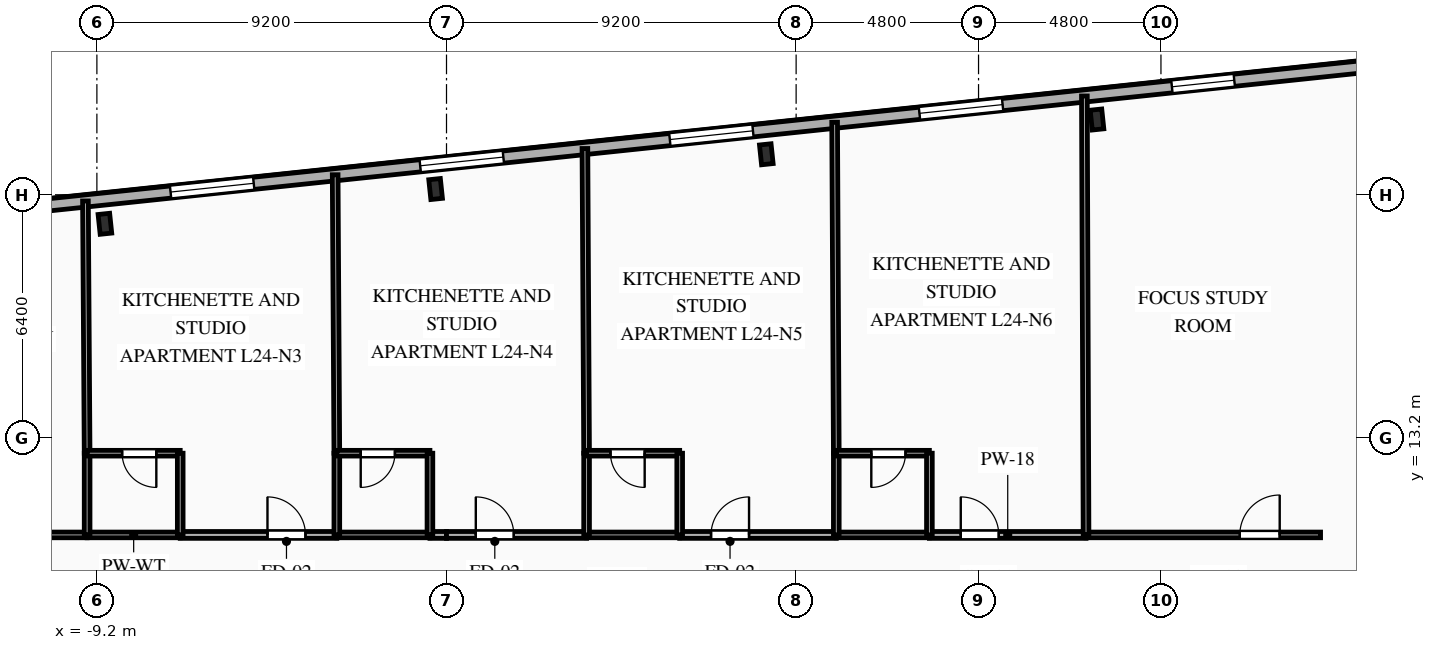
"""IFC4 building model, lengths in metres.
Left out: names, types, materials, properties, quantities, classifications, styles, units other than length and angle.
Written with IfcOpenShell. Run it as: python <this file> out.ifc"""

import sys

from ifc_helpers import new_model, si_unit, direction, frame, frame_2d, origin, origin_2d, place, context, subcontext, project, spatial, rectangle, i_section, extrude, element, fill, save


model = new_model("IFC4")
c1 = context("Model", 3, precision=1e-05, world=origin(), true_north=direction((0.0, 1.0)))
c2 = subcontext(c1, "Body", "Model", "MODEL_VIEW")
j1 = project(units=[si_unit("LENGTHUNIT", "METRE"), si_unit("PLANEANGLEUNIT", "RADIAN")], contexts=[c1])
p1 = place(None, origin())
s1 = spatial("IfcSite", under=j1, at=p1, CompositionType="ELEMENT")
p2 = place(p1, origin())
s2 = spatial("IfcBuilding", under=s1, at=p2, CompositionType="ELEMENT")
p3 = place(p2, frame((0.0, 0.0, 89.05)))
s3 = spatial("IfcBuildingStorey", under=s2, at=p3, CompositionType="ELEMENT", Elevation=89.05)
for number, where, z_axis, x_axis in (
    (1, (17.117, 21.58, 0.0), (0.0, 0.0, 1.0), (0.995, 0.105, 0.0)),
    (2, (8.415, 20.666, 0.0), (0.0, 0.0, 1.0), (0.995, 0.105, 0.0)),
    (3, (-0.287, 19.751, 0.0), (0.0, 0.0, 1.0), (0.995, 0.105, 0.0)),
    (4, (-8.989, 18.836, 0.0), (0.0, 0.0, 1.0), (0.995, 0.105, 0.0)),
):
    element("IfcColumn", number, at=place(p3, frame(where, z_axis=z_axis, x_axis=x_axis)), inside=s3, PredefinedType="COLUMN", context=c2, shape_type="SweptSolid", body=[
        extrude(i_section(OverallWidth=0.306, OverallDepth=0.524, WebThickness=0.021, FlangeThickness=0.04, FilletRadius=0.027, at=origin_2d()), origin(), (0.0, 0.0, 1.0), 3.35),
    ])
p4 = place(p3, frame((-27.107, 17.586, 0.0), z_axis=(0.0, 0.0, 1.0), x_axis=(0.994521628355, 0.104531003701, 0.0)))
e5 = element("IfcWall", 5, at=p4, inside=s3, PredefinedType="SOLIDWALL", context=c2, shape_type="SweptSolid", body=[
    extrude(rectangle(XDim=53.8, YDim=0.32, at=frame_2d((26.9, 0.0))), origin(), (0.0, 0.0, 1.0), 3.045),
])
p5 = place(p4, frame((6.781, 0.0, 0.85)))
e6 = element("IfcOpeningElement", 6, at=p5, cuts=e5, PredefinedType="OPENING", context=c2, shape_type="SweptSolid", body=[
    extrude(rectangle(XDim=1.65, YDim=1.85, at=frame_2d((0.825, 0.925))), frame((0.0, 0.17, 0.0), z_axis=(0.0, -1.0, 0.0), x_axis=(1.0, 0.0, 0.0)), (0.0, 0.0, 1.0), 0.34),
])
p6 = place(p4, frame((14.862, 0.0, 0.85)))
e7 = element("IfcOpeningElement", 7, at=p6, cuts=e5, PredefinedType="OPENING", context=c2, shape_type="SweptSolid", body=[
    extrude(rectangle(XDim=1.5, YDim=1.85, at=frame_2d((0.75, 0.925))), frame((0.0, 0.17, 0.0), z_axis=(0.0, -1.0, 0.0), x_axis=(1.0, 0.0, 0.0)), (0.0, 0.0, 1.0), 0.34),
])
p7 = place(p4, frame((19.956, 0.0, 0.85)))
e8 = element("IfcOpeningElement", 8, at=p7, cuts=e5, PredefinedType="OPENING", context=c2, shape_type="SweptSolid", body=[
    extrude(rectangle(XDim=2.2, YDim=1.85, at=frame_2d((1.1, 0.925))), frame((0.0, 0.17, 0.0), z_axis=(0.0, -1.0, 0.0), x_axis=(1.0, 0.0, 0.0)), (0.0, 0.0, 1.0), 0.34),
])
p8 = place(p4, frame((26.561, 0.0, 0.85)))
e9 = element("IfcOpeningElement", 9, at=p8, cuts=e5, PredefinedType="OPENING", context=c2, shape_type="SweptSolid", body=[
    extrude(rectangle(XDim=2.2, YDim=1.85, at=frame_2d((1.1, 0.925))), frame((0.0, 0.17, 0.0), z_axis=(0.0, -1.0, 0.0), x_axis=(1.0, 0.0, 0.0)), (0.0, 0.0, 1.0), 0.34),
])
p9 = place(p4, frame((33.166, 0.0, 0.85)))
e10 = element("IfcOpeningElement", 10, at=p9, cuts=e5, PredefinedType="OPENING", context=c2, shape_type="SweptSolid", body=[
    extrude(rectangle(XDim=2.2, YDim=1.85, at=frame_2d((1.1, 0.925))), frame((0.0, 0.17, 0.0), z_axis=(0.0, -1.0, 0.0), x_axis=(1.0, 0.0, 0.0)), (0.0, 0.0, 1.0), 0.34),
])
p10 = place(p4, frame((39.771, 0.0, 0.85)))
e11 = element("IfcOpeningElement", 11, at=p10, cuts=e5, PredefinedType="OPENING", context=c2, shape_type="SweptSolid", body=[
    extrude(rectangle(XDim=2.2, YDim=1.85, at=frame_2d((1.1, 0.925))), frame((0.0, 0.17, 0.0), z_axis=(0.0, -1.0, 0.0), x_axis=(1.0, 0.0, 0.0)), (0.0, 0.0, 1.0), 0.34),
])
p11 = place(p4, frame((46.45, 0.0, 0.85)))
e12 = element("IfcOpeningElement", 12, at=p11, cuts=e5, PredefinedType="OPENING", context=c2, shape_type="SweptSolid", body=[
    extrude(rectangle(XDim=1.65, YDim=1.85, at=frame_2d((0.825, 0.925))), frame((0.0, 0.17, 0.0), z_axis=(0.0, -1.0, 0.0), x_axis=(1.0, 0.0, 0.0)), (0.0, 0.0, 1.0), 0.34),
])
p12 = place(p3, frame((-13.679, 10.65, 0.0), z_axis=(0.0, 0.0, 1.0), x_axis=(1.0, 0.0, 0.0)))
e13 = element("IfcWall", 13, at=p12, inside=s3, PredefinedType="PARTITIONING", context=c2, shape_type="SweptSolid", body=[
    extrude(rectangle(XDim=4.222, YDim=0.15, at=frame_2d((2.111, 0.0))), origin(), (0.0, 0.0, 1.0), 3.045),
])
p13 = place(p12, frame((0.844, 0.0, 0.0)))
e14 = element("IfcOpeningElement", 14, at=p13, cuts=e13, PredefinedType="OPENING", context=c2, shape_type="SweptSolid", body=[
    extrude(rectangle(XDim=0.95, YDim=2.1, at=frame_2d((0.475, 1.05))), frame((0.0, 0.085, 0.0), z_axis=(0.0, -1.0, 0.0), x_axis=(1.0, 0.0, 0.0)), (0.0, 0.0, 1.0), 0.17),
])
p14 = place(p3, frame((-7.007, 10.65, 0.0), z_axis=(0.0, 0.0, 1.0), x_axis=(1.0, 0.0, 0.0)))
e15 = element("IfcWall", 15, at=p14, inside=s3, PredefinedType="PARTITIONING", context=c2, shape_type="SweptSolid", body=[
    extrude(rectangle(XDim=4.121, YDim=0.18, at=frame_2d((2.061, 0.0))), origin(), (0.0, 0.0, 1.0), 3.045),
])
p15 = place(p14, frame((2.296, 0.0, 0.0)))
e16 = element("IfcOpeningElement", 16, at=p15, cuts=e15, PredefinedType="OPENING", context=c2, shape_type="SweptSolid", body=[
    extrude(rectangle(XDim=1.0, YDim=2.15, at=frame_2d((0.5, 1.075))), frame((0.0, 0.1, 0.0), z_axis=(0.0, -1.0, 0.0), x_axis=(1.0, 0.0, 0.0)), (0.0, 0.0, 1.0), 0.2),
])
p16 = place(p3, frame((-9.457, 10.65, 0.0), z_axis=(0.0, 0.0, 1.0), x_axis=(1.0, 0.0, 0.0)))
e17 = element("IfcWall", 17, at=p16, inside=s3, PredefinedType="PLUMBINGWALL", context=c2, shape_type="SweptSolid", body=[
    extrude(rectangle(XDim=2.45, YDim=0.15, at=frame_2d((1.225, 0.0))), origin(), (0.0, 0.0, 1.0), 3.045),
])
p17 = place(p3, frame((-0.436, 10.65, 0.0), z_axis=(0.0, 0.0, 1.0), x_axis=(1.0, 0.0, 0.0)))
e18 = element("IfcWall", 18, at=p17, inside=s3, PredefinedType="PARTITIONING", context=c2, shape_type="SweptSolid", body=[
    extrude(rectangle(XDim=0.436, YDim=0.18, at=frame_2d((0.218, 0.0))), origin(), (0.0, 0.0, 1.0), 3.045),
])
p18 = place(p3, frame((-2.886, 10.65, 0.0), z_axis=(0.0, 0.0, 1.0), x_axis=(1.0, 0.0, 0.0)))
e19 = element("IfcWall", 19, at=p18, inside=s3, PredefinedType="PLUMBINGWALL", context=c2, shape_type="SweptSolid", body=[
    extrude(rectangle(XDim=2.45, YDim=0.15, at=frame_2d((1.225, 0.0))), origin(), (0.0, 0.0, 1.0), 3.045),
])
p19 = place(p3, frame((0.0, 10.65, 0.0), z_axis=(0.0, 0.0, 1.0), x_axis=(1.0, 0.0, 0.0)))
e20 = element("IfcWall", 20, at=p19, inside=s3, PredefinedType="PARTITIONING", context=c2, shape_type="SweptSolid", body=[
    extrude(rectangle(XDim=3.686, YDim=0.18, at=frame_2d((1.843, 0.0))), origin(), (0.0, 0.0, 1.0), 3.045),
])
p20 = place(p19, frame((0.771, 0.0, 0.0)))
e21 = element("IfcOpeningElement", 21, at=p20, cuts=e20, PredefinedType="OPENING", context=c2, shape_type="SweptSolid", body=[
    extrude(rectangle(XDim=1.0, YDim=2.15, at=frame_2d((0.5, 1.075))), frame((0.0, 0.1, 0.0), z_axis=(0.0, -1.0, 0.0), x_axis=(1.0, 0.0, 0.0)), (0.0, 0.0, 1.0), 0.2),
])
p21 = place(p3, frame((6.136, 10.65, 0.0), z_axis=(0.0, 0.0, 1.0), x_axis=(1.0, 0.0, 0.0)))
e22 = element("IfcWall", 22, at=p21, inside=s3, PredefinedType="PARTITIONING", context=c2, shape_type="SweptSolid", body=[
    extrude(rectangle(XDim=4.121, YDim=0.18, at=frame_2d((2.061, 0.0))), origin(), (0.0, 0.0, 1.0), 3.045),
])
p22 = place(p21, frame((0.825, 0.0, 0.0)))
e23 = element("IfcOpeningElement", 23, at=p22, cuts=e22, PredefinedType="OPENING", context=c2, shape_type="SweptSolid", body=[
    extrude(rectangle(XDim=1.0, YDim=2.15, at=frame_2d((0.5, 1.075))), frame((0.0, 0.1, 0.0), z_axis=(0.0, -1.0, 0.0), x_axis=(1.0, 0.0, 0.0)), (0.0, 0.0, 1.0), 0.2),
])
p23 = place(p3, frame((3.686, 10.65, 0.0), z_axis=(0.0, 0.0, 1.0), x_axis=(1.0, 0.0, 0.0)))
e24 = element("IfcWall", 24, at=p23, inside=s3, PredefinedType="PLUMBINGWALL", context=c2, shape_type="SweptSolid", body=[
    extrude(rectangle(XDim=2.45, YDim=0.15, at=frame_2d((1.225, 0.0))), origin(), (0.0, 0.0, 1.0), 3.045),
])
p24 = place(p3, frame((12.707, 10.65, 0.0), z_axis=(0.0, 0.0, 1.0), x_axis=(1.0, 0.0, 0.0)))
e25 = element("IfcWall", 25, at=p24, inside=s3, PredefinedType="PARTITIONING", context=c2, shape_type="SweptSolid", body=[
    extrude(rectangle(XDim=4.122, YDim=0.18, at=frame_2d((2.061, 0.0))), origin(), (0.0, 0.0, 1.0), 3.045),
])
p25 = place(p24, frame((0.825, 0.0, 0.0)))
e26 = element("IfcOpeningElement", 26, at=p25, cuts=e25, PredefinedType="OPENING", context=c2, shape_type="SweptSolid", body=[
    extrude(rectangle(XDim=1.0, YDim=2.15, at=frame_2d((0.5, 1.075))), frame((0.0, 0.1, 0.0), z_axis=(0.0, -1.0, 0.0), x_axis=(1.0, 0.0, 0.0)), (0.0, 0.0, 1.0), 0.2),
])
p26 = place(p3, frame((10.257, 10.65, 0.0), z_axis=(0.0, 0.0, 1.0), x_axis=(1.0, 0.0, 0.0)))
e27 = element("IfcWall", 27, at=p26, inside=s3, PredefinedType="PLUMBINGWALL", context=c2, shape_type="SweptSolid", body=[
    extrude(rectangle(XDim=2.45, YDim=0.15, at=frame_2d((1.225, 0.0))), origin(), (0.0, 0.0, 1.0), 3.045),
])
p27 = place(p3, frame((16.829, 10.65, 0.0), z_axis=(0.0, 0.0, 1.0), x_axis=(1.0, 0.0, 0.0)))
e28 = element("IfcWall", 28, at=p27, inside=s3, PredefinedType="PARTITIONING", context=c2, shape_type="SweptSolid", body=[
    extrude(rectangle(XDim=6.171, YDim=0.15, at=frame_2d((3.085, 0.0))), origin(), (0.0, 0.0, 1.0), 3.045),
])
p28 = place(p27, frame((4.046, 0.0, 0.0)))
e29 = element("IfcOpeningElement", 29, at=p28, cuts=e28, PredefinedType="OPENING", context=c2, shape_type="SweptSolid", body=[
    extrude(rectangle(XDim=1.05, YDim=2.15, at=frame_2d((0.525, 1.075))), frame((0.0, 0.085, 0.0), z_axis=(0.0, -1.0, 0.0), x_axis=(1.0, 0.0, 0.0)), (0.0, 0.0, 1.0), 0.17),
])
p29 = place(p3, frame((-9.501, 19.436, 0.0), z_axis=(0.0, 0.0, 1.0), x_axis=(0.006621884097, -0.999978075085, 0.0)))
e30 = element("IfcWall", 30, at=p29, inside=s3, PredefinedType="PARTITIONING", context=c2, shape_type="SweptSolid", body=[
    extrude(rectangle(XDim=6.636, YDim=0.15, at=frame_2d((3.318, 0.0))), origin(), (0.0, 0.0, 1.0), 3.045),
])
p30 = place(p3, frame((-9.457, 12.8, 0.0), z_axis=(0.0, 0.0, 1.0), x_axis=(0.0, -1.0, 0.0)))
e31 = element("IfcWall", 31, at=p30, inside=s3, PredefinedType="PLUMBINGWALL", context=c2, shape_type="SweptSolid", body=[
    extrude(rectangle(XDim=2.15, YDim=0.15, at=frame_2d((1.075, 0.0))), origin(), (0.0, 0.0, 1.0), 3.045),
])
p31 = place(p3, frame((-7.007, 12.8, 0.0), z_axis=(0.0, 0.0, 1.0), x_axis=(-1.0, 0.0, 0.0)))
e32 = element("IfcWall", 32, at=p31, inside=s3, PredefinedType="PLUMBINGWALL", context=c2, shape_type="SweptSolid", body=[
    extrude(rectangle(XDim=2.45, YDim=0.15, at=frame_2d((1.225, 0.0))), origin(), (0.0, 0.0, 1.0), 3.045),
])
p32 = place(p31, frame((0.629, 0.0, 0.0)))
e33 = element("IfcOpeningElement", 33, at=p32, cuts=e32, PredefinedType="OPENING", context=c2, shape_type="SweptSolid", body=[
    extrude(rectangle(XDim=0.9, YDim=2.1, at=frame_2d((0.45, 1.05))), frame((0.0, 0.085, 0.0), z_axis=(0.0, -1.0, 0.0), x_axis=(1.0, 0.0, 0.0)), (0.0, 0.0, 1.0), 0.17),
])
p33 = place(p3, frame((-7.007, 10.65, 0.0), z_axis=(0.0, 0.0, 1.0), x_axis=(0.0, 1.0, 0.0)))
e34 = element("IfcWall", 34, at=p33, inside=s3, PredefinedType="PLUMBINGWALL", context=c2, shape_type="SweptSolid", body=[
    extrude(rectangle(XDim=2.15, YDim=0.15, at=frame_2d((1.075, 0.0))), origin(), (0.0, 0.0, 1.0), 3.045),
])
p34 = place(p3, frame((-2.93, 20.127, 0.0), z_axis=(0.0, 0.0, 1.0), x_axis=(0.005997692928, -0.999982013678, 0.0)))
e35 = element("IfcWall", 35, at=p34, inside=s3, PredefinedType="PARTITIONING", context=c2, shape_type="SweptSolid", body=[
    extrude(rectangle(XDim=7.327, YDim=0.15, at=frame_2d((3.664, 0.0))), origin(), (0.0, 0.0, 1.0), 3.045),
])
p35 = place(p3, frame((-2.886, 12.8, 0.0), z_axis=(0.0, 0.0, 1.0), x_axis=(0.0, -1.0, 0.0)))
e36 = element("IfcWall", 36, at=p35, inside=s3, PredefinedType="PLUMBINGWALL", context=c2, shape_type="SweptSolid", body=[
    extrude(rectangle(XDim=2.15, YDim=0.15, at=frame_2d((1.075, 0.0))), origin(), (0.0, 0.0, 1.0), 3.045),
])
p36 = place(p3, frame((-0.436, 12.8, 0.0), z_axis=(0.0, 0.0, 1.0), x_axis=(-1.0, 0.0, 0.0)))
e37 = element("IfcWall", 37, at=p36, inside=s3, PredefinedType="PLUMBINGWALL", context=c2, shape_type="SweptSolid", body=[
    extrude(rectangle(XDim=2.45, YDim=0.15, at=frame_2d((1.225, 0.0))), origin(), (0.0, 0.0, 1.0), 3.045),
])
p37 = place(p36, frame((0.921, 0.0, 0.0)))
e38 = element("IfcOpeningElement", 38, at=p37, cuts=e37, PredefinedType="OPENING", context=c2, shape_type="SweptSolid", body=[
    extrude(rectangle(XDim=0.9, YDim=2.1, at=frame_2d((0.45, 1.05))), frame((0.0, 0.085, 0.0), z_axis=(0.0, -1.0, 0.0), x_axis=(1.0, 0.0, 0.0)), (0.0, 0.0, 1.0), 0.17),
])
p38 = place(p3, frame((-0.436, 10.65, 0.0), z_axis=(0.0, 0.0, 1.0), x_axis=(0.0, 1.0, 0.0)))
e39 = element("IfcWall", 39, at=p38, inside=s3, PredefinedType="PLUMBINGWALL", context=c2, shape_type="SweptSolid", body=[
    extrude(rectangle(XDim=2.15, YDim=0.15, at=frame_2d((1.075, 0.0))), origin(), (0.0, 0.0, 1.0), 3.045),
])
p39 = place(p3, frame((3.642, 20.818, 0.0), z_axis=(0.0, 0.0, 1.0), x_axis=(0.005481038253, -0.999984978997, 0.0)))
e40 = element("IfcWall", 40, at=p39, inside=s3, PredefinedType="PARTITIONING", context=c2, shape_type="SweptSolid", body=[
    extrude(rectangle(XDim=8.018, YDim=0.15, at=frame_2d((4.009, 0.0))), origin(), (0.0, 0.0, 1.0), 3.045),
])
p40 = place(p3, frame((3.686, 12.8, 0.0), z_axis=(0.0, 0.0, 1.0), x_axis=(0.0, -1.0, 0.0)))
e41 = element("IfcWall", 41, at=p40, inside=s3, PredefinedType="PLUMBINGWALL", context=c2, shape_type="SweptSolid", body=[
    extrude(rectangle(XDim=2.15, YDim=0.15, at=frame_2d((1.075, 0.0))), origin(), (0.0, 0.0, 1.0), 3.045),
])
p41 = place(p3, frame((6.136, 12.8, 0.0), z_axis=(0.0, 0.0, 1.0), x_axis=(-1.0, 0.0, 0.0)))
e42 = element("IfcWall", 42, at=p41, inside=s3, PredefinedType="PLUMBINGWALL", context=c2, shape_type="SweptSolid", body=[
    extrude(rectangle(XDim=2.45, YDim=0.15, at=frame_2d((1.225, 0.0))), origin(), (0.0, 0.0, 1.0), 3.045),
])
p42 = place(p41, frame((0.921, 0.0, 0.0)))
e43 = element("IfcOpeningElement", 43, at=p42, cuts=e42, PredefinedType="OPENING", context=c2, shape_type="SweptSolid", body=[
    extrude(rectangle(XDim=0.9, YDim=2.1, at=frame_2d((0.45, 1.05))), frame((0.0, 0.085, 0.0), z_axis=(0.0, -1.0, 0.0), x_axis=(1.0, 0.0, 0.0)), (0.0, 0.0, 1.0), 0.17),
])
p43 = place(p3, frame((6.136, 10.65, 0.0), z_axis=(0.0, 0.0, 1.0), x_axis=(0.0, 1.0, 0.0)))
e44 = element("IfcWall", 44, at=p43, inside=s3, PredefinedType="PLUMBINGWALL", context=c2, shape_type="SweptSolid", body=[
    extrude(rectangle(XDim=2.15, YDim=0.15, at=frame_2d((1.075, 0.0))), origin(), (0.0, 0.0, 1.0), 3.045),
])
p44 = place(p3, frame((10.213, 21.508, 0.0), z_axis=(0.0, 0.0, 1.0), x_axis=(0.005046334579, -0.999987267173, 0.0)))
e45 = element("IfcWall", 45, at=p44, inside=s3, PredefinedType="PARTITIONING", context=c2, shape_type="SweptSolid", body=[
    extrude(rectangle(XDim=8.708, YDim=0.15, at=frame_2d((4.354, 0.0))), origin(), (0.0, 0.0, 1.0), 3.045),
])
p45 = place(p3, frame((10.257, 12.8, 0.0), z_axis=(0.0, 0.0, 1.0), x_axis=(0.0, -1.0, 0.0)))
e46 = element("IfcWall", 46, at=p45, inside=s3, PredefinedType="PLUMBINGWALL", context=c2, shape_type="SweptSolid", body=[
    extrude(rectangle(XDim=2.15, YDim=0.15, at=frame_2d((1.075, 0.0))), origin(), (0.0, 0.0, 1.0), 3.045),
])
p46 = place(p3, frame((12.707, 12.8, 0.0), z_axis=(0.0, 0.0, 1.0), x_axis=(-1.0, 0.0, 0.0)))
e47 = element("IfcWall", 47, at=p46, inside=s3, PredefinedType="PLUMBINGWALL", context=c2, shape_type="SweptSolid", body=[
    extrude(rectangle(XDim=2.45, YDim=0.15, at=frame_2d((1.225, 0.0))), origin(), (0.0, 0.0, 1.0), 3.045),
])
p47 = place(p46, frame((0.629, 0.0, 0.0)))
e48 = element("IfcOpeningElement", 48, at=p47, cuts=e47, PredefinedType="OPENING", context=c2, shape_type="SweptSolid", body=[
    extrude(rectangle(XDim=0.9, YDim=2.1, at=frame_2d((0.45, 1.05))), frame((0.0, 0.085, 0.0), z_axis=(0.0, -1.0, 0.0), x_axis=(1.0, 0.0, 0.0)), (0.0, 0.0, 1.0), 0.17),
])
p48 = place(p3, frame((12.707, 10.65, 0.0), z_axis=(0.0, 0.0, 1.0), x_axis=(0.0, 1.0, 0.0)))
e49 = element("IfcWall", 49, at=p48, inside=s3, PredefinedType="PLUMBINGWALL", context=c2, shape_type="SweptSolid", body=[
    extrude(rectangle(XDim=2.15, YDim=0.15, at=frame_2d((1.075, 0.0))), origin(), (0.0, 0.0, 1.0), 3.045),
])
p49 = place(p3, frame((16.785, 22.199, 0.0), z_axis=(0.0, 0.0, 1.0), x_axis=(0.003805067053, -0.999992760706, 0.0)))
e50 = element("IfcWall", 50, at=p49, inside=s3, PredefinedType="PARTITIONING", context=c2, shape_type="SweptSolid", body=[
    extrude(rectangle(XDim=11.549, YDim=0.15, at=frame_2d((5.774, 0.0))), origin(), (0.0, 0.0, 1.0), 3.045),
])
p50 = place(p7, origin())
e51 = element("IfcWindow", 51, at=p50, inside=s3, PartitioningType="SINGLE_PANEL", PredefinedType="WINDOW", context=c2, shape_type="SweptSolid", body=[
    extrude(rectangle(XDim=2.2, YDim=1.85, at=frame_2d((1.1, 0.925))), frame((0.0, 0.03, 0.0), z_axis=(0.0, -1.0, 0.0), x_axis=(1.0, 0.0, 0.0)), (0.0, 0.0, 1.0), 0.06),
])
fill(e8, e51)
p51 = place(p8, origin())
e52 = element("IfcWindow", 52, at=p51, inside=s3, PartitioningType="SINGLE_PANEL", PredefinedType="WINDOW", context=c2, shape_type="SweptSolid", body=[
    extrude(rectangle(XDim=2.2, YDim=1.85, at=frame_2d((1.1, 0.925))), frame((0.0, 0.03, 0.0), z_axis=(0.0, -1.0, 0.0), x_axis=(1.0, 0.0, 0.0)), (0.0, 0.0, 1.0), 0.06),
])
fill(e9, e52)
p52 = place(p9, origin())
e53 = element("IfcWindow", 53, at=p52, inside=s3, PartitioningType="SINGLE_PANEL", PredefinedType="WINDOW", context=c2, shape_type="SweptSolid", body=[
    extrude(rectangle(XDim=2.2, YDim=1.85, at=frame_2d((1.1, 0.925))), frame((0.0, 0.03, 0.0), z_axis=(0.0, -1.0, 0.0), x_axis=(1.0, 0.0, 0.0)), (0.0, 0.0, 1.0), 0.06),
])
fill(e10, e53)
p53 = place(p10, origin())
e54 = element("IfcWindow", 54, at=p53, inside=s3, PartitioningType="SINGLE_PANEL", PredefinedType="WINDOW", context=c2, shape_type="SweptSolid", body=[
    extrude(rectangle(XDim=2.2, YDim=1.85, at=frame_2d((1.1, 0.925))), frame((0.0, 0.03, 0.0), z_axis=(0.0, -1.0, 0.0), x_axis=(1.0, 0.0, 0.0)), (0.0, 0.0, 1.0), 0.06),
])
fill(e11, e54)
p54 = place(p11, origin())
e55 = element("IfcWindow", 55, at=p54, inside=s3, PartitioningType="SINGLE_PANEL", PredefinedType="WINDOW", context=c2, shape_type="SweptSolid", body=[
    extrude(rectangle(XDim=1.65, YDim=1.85, at=frame_2d((0.825, 0.925))), frame((0.0, 0.03, 0.0), z_axis=(0.0, -1.0, 0.0), x_axis=(1.0, 0.0, 0.0)), (0.0, 0.0, 1.0), 0.06),
])
fill(e12, e55)
p55 = place(p15, origin())
e56 = element("IfcDoor", 56, at=p55, inside=s3, OperationType="SINGLE_SWING_LEFT", PredefinedType="DOOR", context=c2, shape_type="SweptSolid", body=[
    extrude(rectangle(XDim=1.0, YDim=2.15, at=frame_2d((0.5, 1.075))), frame((0.0, 0.025, 0.0), z_axis=(0.0, -1.0, 0.0), x_axis=(1.0, 0.0, 0.0)), (0.0, 0.0, 1.0), 0.05),
])
fill(e16, e56)
p56 = place(p20, origin())
e57 = element("IfcDoor", 57, at=p56, inside=s3, OperationType="SINGLE_SWING_LEFT", PredefinedType="DOOR", context=c2, shape_type="SweptSolid", body=[
    extrude(rectangle(XDim=1.0, YDim=2.15, at=frame_2d((0.5, 1.075))), frame((0.0, 0.025, 0.0), z_axis=(0.0, -1.0, 0.0), x_axis=(1.0, 0.0, 0.0)), (0.0, 0.0, 1.0), 0.05),
])
fill(e21, e57)
p57 = place(p22, origin())
e58 = element("IfcDoor", 58, at=p57, inside=s3, OperationType="SINGLE_SWING_RIGHT", PredefinedType="DOOR", context=c2, shape_type="SweptSolid", body=[
    extrude(rectangle(XDim=1.0, YDim=2.15, at=frame_2d((0.5, 1.075))), frame((0.0, 0.025, 0.0), z_axis=(0.0, -1.0, 0.0), x_axis=(1.0, 0.0, 0.0)), (0.0, 0.0, 1.0), 0.05),
])
fill(e23, e58)
p58 = place(p25, origin())
e59 = element("IfcDoor", 59, at=p58, inside=s3, OperationType="SINGLE_SWING_LEFT", PredefinedType="DOOR", context=c2, shape_type="SweptSolid", body=[
    extrude(rectangle(XDim=1.0, YDim=2.15, at=frame_2d((0.5, 1.075))), frame((0.0, 0.025, 0.0), z_axis=(0.0, -1.0, 0.0), x_axis=(1.0, 0.0, 0.0)), (0.0, 0.0, 1.0), 0.05),
])
fill(e26, e59)
p59 = place(p28, origin())
e60 = element("IfcDoor", 60, at=p59, inside=s3, OperationType="SINGLE_SWING_RIGHT", PredefinedType="DOOR", context=c2, shape_type="SweptSolid", body=[
    extrude(rectangle(XDim=1.05, YDim=2.15, at=frame_2d((0.525, 1.075))), frame((0.0, 0.025, 0.0), z_axis=(0.0, -1.0, 0.0), x_axis=(1.0, 0.0, 0.0)), (0.0, 0.0, 1.0), 0.05),
])
fill(e29, e60)
p60 = place(p32, origin())
e61 = element("IfcDoor", 61, at=p60, inside=s3, OperationType="SINGLE_SWING_LEFT", PredefinedType="DOOR", context=c2, shape_type="SweptSolid", body=[
    extrude(rectangle(XDim=0.9, YDim=2.1, at=frame_2d((0.45, 1.05))), frame((0.0, 0.025, 0.0), z_axis=(0.0, -1.0, 0.0), x_axis=(1.0, 0.0, 0.0)), (0.0, 0.0, 1.0), 0.05),
])
fill(e33, e61)
p61 = place(p37, origin())
e62 = element("IfcDoor", 62, at=p61, inside=s3, OperationType="SINGLE_SWING_RIGHT", PredefinedType="DOOR", context=c2, shape_type="SweptSolid", body=[
    extrude(rectangle(XDim=0.9, YDim=2.1, at=frame_2d((0.45, 1.05))), frame((0.0, 0.025, 0.0), z_axis=(0.0, -1.0, 0.0), x_axis=(1.0, 0.0, 0.0)), (0.0, 0.0, 1.0), 0.05),
])
fill(e38, e62)
p62 = place(p42, origin())
e63 = element("IfcDoor", 63, at=p62, inside=s3, OperationType="SINGLE_SWING_LEFT", PredefinedType="DOOR", context=c2, shape_type="SweptSolid", body=[
    extrude(rectangle(XDim=0.9, YDim=2.1, at=frame_2d((0.45, 1.05))), frame((0.0, 0.025, 0.0), z_axis=(0.0, -1.0, 0.0), x_axis=(1.0, 0.0, 0.0)), (0.0, 0.0, 1.0), 0.05),
])
fill(e43, e63)
p63 = place(p47, origin())
e64 = element("IfcDoor", 64, at=p63, inside=s3, OperationType="SINGLE_SWING_RIGHT", PredefinedType="DOOR", context=c2, shape_type="SweptSolid", body=[
    extrude(rectangle(XDim=0.9, YDim=2.1, at=frame_2d((0.45, 1.05))), frame((0.0, 0.025, 0.0), z_axis=(0.0, -1.0, 0.0), x_axis=(1.0, 0.0, 0.0)), (0.0, 0.0, 1.0), 0.05),
])
fill(e48, e64)
save(model, sys.argv[1])
